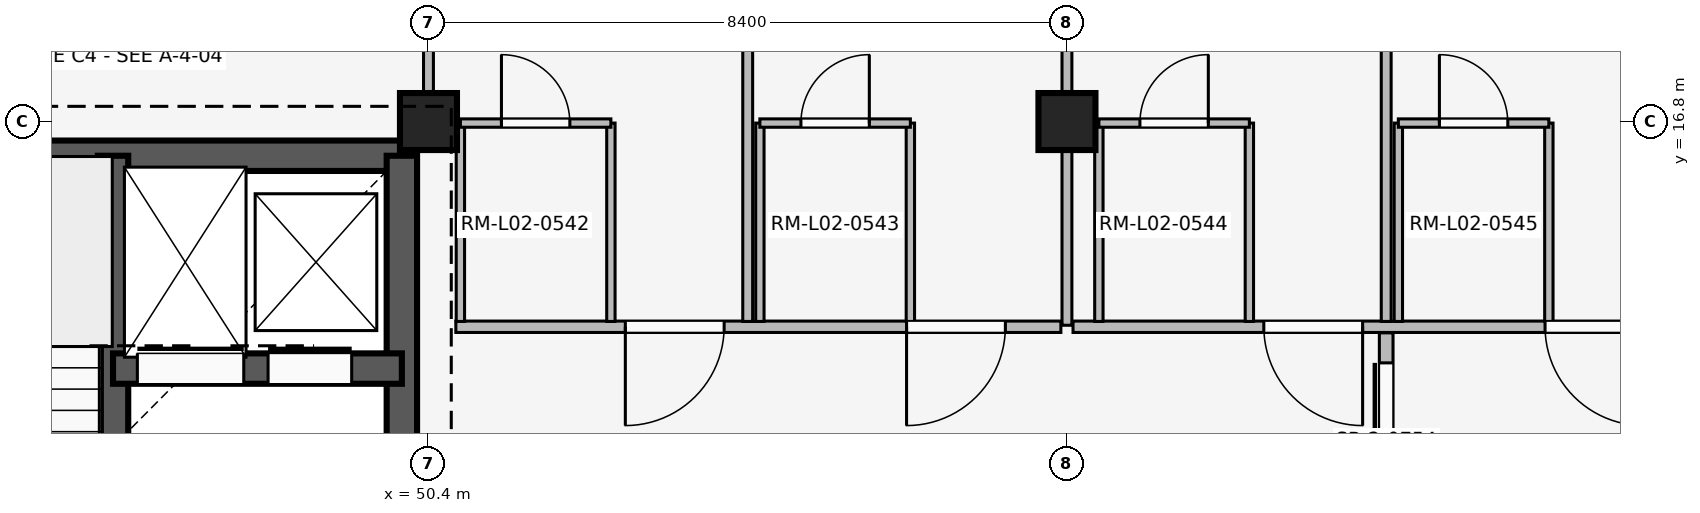
"""IFC4 building model, lengths in metres.
Left out: names, types, materials, properties, quantities, classifications, styles, units other than length and angle.
Written with IfcOpenShell. Run it as: python <this file> out.ifc"""

import sys

from ifc_helpers import new_model, si_unit, direction, frame, frame_2d, origin, origin_2d, place, context, subcontext, project, spatial, rectangle, extrude, element, fill, save


model = new_model("IFC4")
c1 = context("Model", 3, precision=1e-05, world=origin(), true_north=direction((0.0, 1.0)))
c2 = subcontext(c1, "Body", "Model", "MODEL_VIEW")
j1 = project(units=[si_unit("LENGTHUNIT", "METRE"), si_unit("PLANEANGLEUNIT", "RADIAN")], contexts=[c1])
p1 = place(None, origin())
s1 = spatial("IfcSite", under=j1, at=p1, CompositionType="ELEMENT")
p2 = place(p1, origin())
s2 = spatial("IfcBuilding", under=s1, at=p2, CompositionType="ELEMENT")
p3 = place(p2, frame((0.0, 0.0, 8.1)))
s3 = spatial("IfcBuildingStorey", under=s2, at=p3, CompositionType="ELEMENT", Elevation=8.1)
for number, where, z_axis, x_axis in (
    (1, (50.4, 16.8, 0.0), (0.0, 0.0, 1.0), (1.0, 0.0, 0.0)),
    (2, (58.8, 16.8, 0.0), (0.0, 0.0, 1.0), (1.0, 0.0, 0.0)),
):
    element("IfcColumn", number, at=place(p3, frame(where, z_axis=z_axis, x_axis=x_axis)), inside=s3, PredefinedType="COLUMN", context=c2, shape_type="SweptSolid", body=[
        extrude(rectangle(XDim=0.75, YDim=0.75, at=origin_2d()), origin(), (0.0, 0.0, 1.0), 4.8),
    ])
p4 = place(p3, frame((42.55, 16.35, 0.0), z_axis=(0.0, 0.0, 1.0), x_axis=(1.0, 0.0, 0.0)))
e3 = element("IfcWall", 3, at=p4, inside=s3, PredefinedType="SHEAR", context=c2, shape_type="SweptSolid", body=[
    extrude(rectangle(XDim=7.5, YDim=0.4, at=frame_2d((3.75, 0.0))), origin(), (0.0, 0.0, 1.0), 4.52),
])
p5 = place(p3, frame((50.05, 8.8, 0.0), z_axis=(0.0, 0.0, 1.0), x_axis=(0.0, 1.0, 0.0)))
e4 = element("IfcWall", 4, at=p5, inside=s3, PredefinedType="SHEAR", context=c2, shape_type="SweptSolid", body=[
    extrude(rectangle(XDim=7.55, YDim=0.4, at=frame_2d((3.775, 0.0))), origin(), (0.0, 0.0, 1.0), 4.52),
])
p6 = place(p5, frame((2.4, 0.0, 0.0)))
e5 = element("IfcOpeningElement", 5, at=p6, cuts=e4, PredefinedType="OPENING", context=c2, shape_type="SweptSolid", body=[
    extrude(rectangle(XDim=1.2, YDim=2.2, at=frame_2d((0.6, 1.1))), frame((0.0, 0.21, 0.0), z_axis=(0.0, -1.0, 0.0), x_axis=(1.0, 0.0, 0.0)), (0.0, 0.0, 1.0), 0.42),
])
p7 = place(p3, frame((46.25, 8.8, 0.0), z_axis=(0.0, 0.0, 1.0), x_axis=(0.0, 1.0, 0.0)))
e6 = element("IfcWall", 6, at=p7, inside=s3, PredefinedType="SHEAR", context=c2, shape_type="SweptSolid", body=[
    extrude(rectangle(XDim=7.55, YDim=0.4, at=frame_2d((3.775, 0.0))), origin(), (0.0, 0.0, 1.0), 4.52),
])
p8 = place(p7, frame((0.28, 0.0, 0.0)))
e7 = element("IfcOpeningElement", 7, at=p8, cuts=e6, PredefinedType="OPENING", context=c2, shape_type="SweptSolid", body=[
    extrude(rectangle(XDim=1.0, YDim=2.15, at=frame_2d((0.5, 1.075))), frame((0.0, 0.21, 0.0), z_axis=(0.0, -1.0, 0.0), x_axis=(1.0, 0.0, 0.0)), (0.0, 0.0, 1.0), 0.42),
])
p9 = place(p3, frame((46.25, 13.55, 0.0), z_axis=(0.0, 0.0, 1.0), x_axis=(1.0, 0.0, 0.0)))
e8 = element("IfcWall", 8, at=p9, inside=s3, PredefinedType="SHEAR", context=c2, shape_type="SweptSolid", body=[
    extrude(rectangle(XDim=3.8, YDim=0.4, at=frame_2d((1.9, 0.0))), origin(), (0.0, 0.0, 1.0), 4.52),
])
p10 = place(p9, frame((0.32, 0.0, 0.0)))
e9 = element("IfcOpeningElement", 9, at=p10, cuts=e8, PredefinedType="OPENING", context=c2, shape_type="SweptSolid", body=[
    extrude(rectangle(XDim=1.4, YDim=2.25, at=frame_2d((0.7, 1.125))), frame((0.0, 0.21, 0.0), z_axis=(0.0, -1.0, 0.0), x_axis=(1.0, 0.0, 0.0)), (0.0, 0.0, 1.0), 0.42),
])
p11 = place(p9, frame((2.04, 0.0, 0.0)))
e10 = element("IfcOpeningElement", 10, at=p11, cuts=e8, PredefinedType="OPENING", context=c2, shape_type="SweptSolid", body=[
    extrude(rectangle(XDim=1.1, YDim=2.15, at=frame_2d((0.55, 1.075))), frame((0.0, 0.21, 0.0), z_axis=(0.0, -1.0, 0.0), x_axis=(1.0, 0.0, 0.0)), (0.0, 0.0, 1.0), 0.42),
])
p12 = place(p3, frame((50.4, 17.15, 0.0), z_axis=(0.0, 0.0, 1.0), x_axis=(0.0, 1.0, 0.0)))
e11 = element("IfcWall", 11, at=p12, inside=s3, PredefinedType="PARTITIONING", context=c2, shape_type="SweptSolid", body=[
    extrude(rectangle(XDim=7.91, YDim=0.13, at=frame_2d((3.955, 0.0))), origin(), (0.0, 0.0, 1.0), 3.84),
])
p13 = place(p12, frame((3.4, 0.0, 0.0)))
e12 = element("IfcOpeningElement", 12, at=p13, cuts=e11, PredefinedType="OPENING", context=c2, shape_type="SweptSolid", body=[
    extrude(rectangle(XDim=1.05, YDim=2.2, at=frame_2d((0.525, 1.1))), frame((0.0, 0.075, 0.0), z_axis=(0.0, -1.0, 0.0), x_axis=(1.0, 0.0, 0.0)), (0.0, 0.0, 1.0), 0.15),
])
p14 = place(p3, frame((58.72, 14.1, 0.0), z_axis=(0.0, 0.0, 1.0), x_axis=(-1.0, 0.0, 0.0)))
e13 = element("IfcWall", 13, at=p14, inside=s3, PredefinedType="PARTITIONING", context=c2, shape_type="SweptSolid", body=[
    extrude(rectangle(XDim=7.96, YDim=0.15, at=frame_2d((3.98, 0.0))), origin(), (0.0, 0.0, 1.0), 3.84),
])
p15 = place(p14, frame((0.73, 0.0, 0.0)))
e14 = element("IfcOpeningElement", 14, at=p15, cuts=e13, PredefinedType="OPENING", context=c2, shape_type="SweptSolid", body=[
    extrude(rectangle(XDim=1.3, YDim=2.25, at=frame_2d((0.65, 1.125))), frame((0.0, 0.085, 0.0), z_axis=(0.0, -1.0, 0.0), x_axis=(1.0, 0.0, 0.0)), (0.0, 0.0, 1.0), 0.17),
])
p16 = place(p14, frame((4.43, 0.0, 0.0)))
e15 = element("IfcOpeningElement", 15, at=p16, cuts=e13, PredefinedType="OPENING", context=c2, shape_type="SweptSolid", body=[
    extrude(rectangle(XDim=1.3, YDim=2.25, at=frame_2d((0.65, 1.125))), frame((0.0, 0.085, 0.0), z_axis=(0.0, -1.0, 0.0), x_axis=(1.0, 0.0, 0.0)), (0.0, 0.0, 1.0), 0.17),
])
p17 = place(p3, frame((54.6, 14.17, 0.0), z_axis=(0.0, 0.0, 1.0), x_axis=(0.0, 1.0, 0.0)))
e16 = element("IfcWall", 16, at=p17, inside=s3, PredefinedType="PARTITIONING", context=c2, shape_type="SweptSolid", body=[
    extrude(rectangle(XDim=10.93, YDim=0.13, at=frame_2d((5.465, 0.0))), origin(), (0.0, 0.0, 1.0), 3.84),
])
for number, where, z_axis, x_axis in (
    (17, (50.82, 14.17, 0.0), (0.0, 0.0, 1.0), (0.0, 1.0, 0.0)),
    (18, (52.8, 14.17, 0.0), (0.0, 0.0, 1.0), (0.0, 1.0, 0.0)),
):
    element("IfcWall", number, at=place(p3, frame(where, z_axis=z_axis, x_axis=x_axis)), inside=s3, PredefinedType="PARTITIONING", context=c2, shape_type="SweptSolid", body=[
        extrude(rectangle(XDim=2.61, YDim=0.11, at=frame_2d((1.305, 0.0))), origin(), (0.0, 0.0, 1.0), 3.84),
    ])
p18 = place(p3, frame((50.82, 16.78, 0.0), z_axis=(0.0, 0.0, 1.0), x_axis=(1.0, 0.0, 0.0)))
e19 = element("IfcWall", 19, at=p18, inside=s3, PredefinedType="PARTITIONING", context=c2, shape_type="SweptSolid", body=[
    extrude(rectangle(XDim=1.98, YDim=0.11, at=frame_2d((0.99, 0.0))), origin(), (0.0, 0.0, 1.0), 3.84),
])
p19 = place(p18, frame((0.54, 0.0, 0.0)))
e20 = element("IfcOpeningElement", 20, at=p19, cuts=e19, PredefinedType="OPENING", context=c2, shape_type="SweptSolid", body=[
    extrude(rectangle(XDim=0.9, YDim=2.1, at=frame_2d((0.45, 1.05))), frame((0.0, 0.065, 0.0), z_axis=(0.0, -1.0, 0.0), x_axis=(1.0, 0.0, 0.0)), (0.0, 0.0, 1.0), 0.13),
])
for number, where, z_axis, x_axis in (
    (21, (54.76, 14.17, 0.0), (0.0, 0.0, 1.0), (0.0, 1.0, 0.0)),
    (22, (56.74, 14.17, 0.0), (0.0, 0.0, 1.0), (0.0, 1.0, 0.0)),
):
    element("IfcWall", number, at=place(p3, frame(where, z_axis=z_axis, x_axis=x_axis)), inside=s3, PredefinedType="PARTITIONING", context=c2, shape_type="SweptSolid", body=[
        extrude(rectangle(XDim=2.61, YDim=0.11, at=frame_2d((1.305, 0.0))), origin(), (0.0, 0.0, 1.0), 3.84),
    ])
p20 = place(p3, frame((54.76, 16.78, 0.0), z_axis=(0.0, 0.0, 1.0), x_axis=(1.0, 0.0, 0.0)))
e23 = element("IfcWall", 23, at=p20, inside=s3, PredefinedType="PARTITIONING", context=c2, shape_type="SweptSolid", body=[
    extrude(rectangle(XDim=1.98, YDim=0.11, at=frame_2d((0.99, 0.0))), origin(), (0.0, 0.0, 1.0), 3.84),
])
p21 = place(p20, frame((0.54, 0.0, 0.0)))
e24 = element("IfcOpeningElement", 24, at=p21, cuts=e23, PredefinedType="OPENING", context=c2, shape_type="SweptSolid", body=[
    extrude(rectangle(XDim=0.9, YDim=2.1, at=frame_2d((0.45, 1.05))), frame((0.0, 0.065, 0.0), z_axis=(0.0, -1.0, 0.0), x_axis=(1.0, 0.0, 0.0)), (0.0, 0.0, 1.0), 0.13),
])
p22 = place(p3, frame((58.8, 14.12, 0.0), z_axis=(0.0, 0.0, 1.0), x_axis=(0.0, 1.0, 0.0)))
e25 = element("IfcWall", 25, at=p22, inside=s3, PredefinedType="PARTITIONING", context=c2, shape_type="SweptSolid", body=[
    extrude(rectangle(XDim=10.94, YDim=0.13, at=frame_2d((5.47, 0.0))), origin(), (0.0, 0.0, 1.0), 3.84),
])
p23 = place(p3, frame((67.12, 14.1, 0.0), z_axis=(0.0, 0.0, 1.0), x_axis=(-1.0, 0.0, 0.0)))
e26 = element("IfcWall", 26, at=p23, inside=s3, PredefinedType="PARTITIONING", context=c2, shape_type="SweptSolid", body=[
    extrude(rectangle(XDim=8.24, YDim=0.15, at=frame_2d((4.12, 0.0))), origin(), (0.0, 0.0, 1.0), 3.84),
])
p24 = place(p23, frame((0.73, 0.0, 0.0)))
e27 = element("IfcOpeningElement", 27, at=p24, cuts=e26, PredefinedType="OPENING", context=c2, shape_type="SweptSolid", body=[
    extrude(rectangle(XDim=1.3, YDim=2.25, at=frame_2d((0.65, 1.125))), frame((0.0, 0.085, 0.0), z_axis=(0.0, -1.0, 0.0), x_axis=(1.0, 0.0, 0.0)), (0.0, 0.0, 1.0), 0.17),
])
p25 = place(p23, frame((4.43, 0.0, 0.0)))
e28 = element("IfcOpeningElement", 28, at=p25, cuts=e26, PredefinedType="OPENING", context=c2, shape_type="SweptSolid", body=[
    extrude(rectangle(XDim=1.3, YDim=2.25, at=frame_2d((0.65, 1.125))), frame((0.0, 0.085, 0.0), z_axis=(0.0, -1.0, 0.0), x_axis=(1.0, 0.0, 0.0)), (0.0, 0.0, 1.0), 0.17),
])
p26 = place(p3, frame((63.0, 14.17, 0.0), z_axis=(0.0, 0.0, 1.0), x_axis=(0.0, 1.0, 0.0)))
e29 = element("IfcWall", 29, at=p26, inside=s3, PredefinedType="PARTITIONING", context=c2, shape_type="SweptSolid", body=[
    extrude(rectangle(XDim=10.93, YDim=0.13, at=frame_2d((5.465, 0.0))), origin(), (0.0, 0.0, 1.0), 3.84),
])
for number, where, z_axis, x_axis in (
    (30, (59.22, 14.17, 0.0), (0.0, 0.0, 1.0), (0.0, 1.0, 0.0)),
    (31, (61.2, 14.17, 0.0), (0.0, 0.0, 1.0), (0.0, 1.0, 0.0)),
):
    element("IfcWall", number, at=place(p3, frame(where, z_axis=z_axis, x_axis=x_axis)), inside=s3, PredefinedType="PARTITIONING", context=c2, shape_type="SweptSolid", body=[
        extrude(rectangle(XDim=2.61, YDim=0.11, at=frame_2d((1.305, 0.0))), origin(), (0.0, 0.0, 1.0), 3.84),
    ])
p27 = place(p3, frame((59.22, 16.78, 0.0), z_axis=(0.0, 0.0, 1.0), x_axis=(1.0, 0.0, 0.0)))
e32 = element("IfcWall", 32, at=p27, inside=s3, PredefinedType="PARTITIONING", context=c2, shape_type="SweptSolid", body=[
    extrude(rectangle(XDim=1.98, YDim=0.11, at=frame_2d((0.99, 0.0))), origin(), (0.0, 0.0, 1.0), 3.84),
])
p28 = place(p27, frame((0.54, 0.0, 0.0)))
e33 = element("IfcOpeningElement", 33, at=p28, cuts=e32, PredefinedType="OPENING", context=c2, shape_type="SweptSolid", body=[
    extrude(rectangle(XDim=0.9, YDim=2.1, at=frame_2d((0.45, 1.05))), frame((0.0, 0.065, 0.0), z_axis=(0.0, -1.0, 0.0), x_axis=(1.0, 0.0, 0.0)), (0.0, 0.0, 1.0), 0.13),
])
for number, where, z_axis, x_axis in (
    (34, (63.16, 14.17, 0.0), (0.0, 0.0, 1.0), (0.0, 1.0, 0.0)),
    (35, (65.14, 14.17, 0.0), (0.0, 0.0, 1.0), (0.0, 1.0, 0.0)),
):
    element("IfcWall", number, at=place(p3, frame(where, z_axis=z_axis, x_axis=x_axis)), inside=s3, PredefinedType="PARTITIONING", context=c2, shape_type="SweptSolid", body=[
        extrude(rectangle(XDim=2.61, YDim=0.11, at=frame_2d((1.305, 0.0))), origin(), (0.0, 0.0, 1.0), 3.84),
    ])
p29 = place(p3, frame((63.16, 16.78, 0.0), z_axis=(0.0, 0.0, 1.0), x_axis=(1.0, 0.0, 0.0)))
e36 = element("IfcWall", 36, at=p29, inside=s3, PredefinedType="PARTITIONING", context=c2, shape_type="SweptSolid", body=[
    extrude(rectangle(XDim=1.98, YDim=0.11, at=frame_2d((0.99, 0.0))), origin(), (0.0, 0.0, 1.0), 3.84),
])
p30 = place(p29, frame((0.54, 0.0, 0.0)))
e37 = element("IfcOpeningElement", 37, at=p30, cuts=e36, PredefinedType="OPENING", context=c2, shape_type="SweptSolid", body=[
    extrude(rectangle(XDim=0.9, YDim=2.1, at=frame_2d((0.45, 1.05))), frame((0.0, 0.065, 0.0), z_axis=(0.0, -1.0, 0.0), x_axis=(1.0, 0.0, 0.0)), (0.0, 0.0, 1.0), 0.13),
])
p31 = place(p3, frame((63.0, 11.18, 0.0), z_axis=(0.0, 0.0, 1.0), x_axis=(0.0, 1.0, 0.0)))
e38 = element("IfcWall", 38, at=p31, inside=s3, PredefinedType="PARTITIONING", context=c2, shape_type="SweptSolid", body=[
    extrude(rectangle(XDim=2.84, YDim=0.18, at=frame_2d((1.42, 0.0))), origin(), (0.0, 0.0, 1.0), 3.84),
])
p32 = place(p31, frame((0.395, 0.0, 0.0)))
e39 = element("IfcOpeningElement", 39, at=p32, cuts=e38, PredefinedType="OPENING", context=c2, shape_type="SweptSolid", body=[
    extrude(rectangle(XDim=2.05, YDim=2.35, at=frame_2d((1.025, 1.175))), frame((0.0, 0.1, 0.0), z_axis=(0.0, -1.0, 0.0), x_axis=(1.0, 0.0, 0.0)), (0.0, 0.0, 1.0), 0.2),
])
p33 = place(p10, origin())
e40 = element("IfcDoor", 40, at=p33, inside=s3, OperationType="SLIDING_TO_LEFT", PredefinedType="DOOR", context=c2, shape_type="SweptSolid", body=[
    extrude(rectangle(XDim=1.4, YDim=2.25, at=frame_2d((0.7, 1.125))), frame((0.0, 0.025, 0.0), z_axis=(0.0, -1.0, 0.0), x_axis=(1.0, 0.0, 0.0)), (0.0, 0.0, 1.0), 0.05),
])
fill(e9, e40)
p34 = place(p11, origin())
e41 = element("IfcDoor", 41, at=p34, inside=s3, OperationType="SLIDING_TO_LEFT", PredefinedType="DOOR", context=c2, shape_type="SweptSolid", body=[
    extrude(rectangle(XDim=1.1, YDim=2.15, at=frame_2d((0.55, 1.075))), frame((0.0, 0.025, 0.0), z_axis=(0.0, -1.0, 0.0), x_axis=(1.0, 0.0, 0.0)), (0.0, 0.0, 1.0), 0.05),
])
fill(e10, e41)
p35 = place(p15, origin())
e42 = element("IfcDoor", 42, at=p35, inside=s3, OperationType="SINGLE_SWING_RIGHT", PredefinedType="DOOR", context=c2, shape_type="SweptSolid", body=[
    extrude(rectangle(XDim=1.3, YDim=2.25, at=frame_2d((0.65, 1.125))), frame((0.0, 0.025, 0.0), z_axis=(0.0, -1.0, 0.0), x_axis=(1.0, 0.0, 0.0)), (0.0, 0.0, 1.0), 0.05),
])
fill(e14, e42)
p36 = place(p16, origin())
e43 = element("IfcDoor", 43, at=p36, inside=s3, OperationType="SINGLE_SWING_RIGHT", PredefinedType="DOOR", context=c2, shape_type="SweptSolid", body=[
    extrude(rectangle(XDim=1.3, YDim=2.25, at=frame_2d((0.65, 1.125))), frame((0.0, 0.025, 0.0), z_axis=(0.0, -1.0, 0.0), x_axis=(1.0, 0.0, 0.0)), (0.0, 0.0, 1.0), 0.05),
])
fill(e15, e43)
p37 = place(p19, origin())
e44 = element("IfcDoor", 44, at=p37, inside=s3, OperationType="SINGLE_SWING_LEFT", PredefinedType="DOOR", context=c2, shape_type="SweptSolid", body=[
    extrude(rectangle(XDim=0.9, YDim=2.1, at=frame_2d((0.45, 1.05))), frame((0.0, 0.025, 0.0), z_axis=(0.0, -1.0, 0.0), x_axis=(1.0, 0.0, 0.0)), (0.0, 0.0, 1.0), 0.05),
])
fill(e20, e44)
p38 = place(p21, origin())
e45 = element("IfcDoor", 45, at=p38, inside=s3, OperationType="SINGLE_SWING_RIGHT", PredefinedType="DOOR", context=c2, shape_type="SweptSolid", body=[
    extrude(rectangle(XDim=0.9, YDim=2.1, at=frame_2d((0.45, 1.05))), frame((0.0, 0.025, 0.0), z_axis=(0.0, -1.0, 0.0), x_axis=(1.0, 0.0, 0.0)), (0.0, 0.0, 1.0), 0.05),
])
fill(e24, e45)
p39 = place(p24, origin())
e46 = element("IfcDoor", 46, at=p39, inside=s3, OperationType="SINGLE_SWING_LEFT", PredefinedType="DOOR", context=c2, shape_type="SweptSolid", body=[
    extrude(rectangle(XDim=1.3, YDim=2.25, at=frame_2d((0.65, 1.125))), frame((0.0, 0.025, 0.0), z_axis=(0.0, -1.0, 0.0), x_axis=(1.0, 0.0, 0.0)), (0.0, 0.0, 1.0), 0.05),
])
fill(e27, e46)
p40 = place(p25, origin())
e47 = element("IfcDoor", 47, at=p40, inside=s3, OperationType="SINGLE_SWING_LEFT", PredefinedType="DOOR", context=c2, shape_type="SweptSolid", body=[
    extrude(rectangle(XDim=1.3, YDim=2.25, at=frame_2d((0.65, 1.125))), frame((0.0, 0.025, 0.0), z_axis=(0.0, -1.0, 0.0), x_axis=(1.0, 0.0, 0.0)), (0.0, 0.0, 1.0), 0.05),
])
fill(e28, e47)
p41 = place(p28, origin())
e48 = element("IfcDoor", 48, at=p41, inside=s3, OperationType="SINGLE_SWING_RIGHT", PredefinedType="DOOR", context=c2, shape_type="SweptSolid", body=[
    extrude(rectangle(XDim=0.9, YDim=2.1, at=frame_2d((0.45, 1.05))), frame((0.0, 0.025, 0.0), z_axis=(0.0, -1.0, 0.0), x_axis=(1.0, 0.0, 0.0)), (0.0, 0.0, 1.0), 0.05),
])
fill(e33, e48)
p42 = place(p30, origin())
e49 = element("IfcDoor", 49, at=p42, inside=s3, OperationType="SINGLE_SWING_LEFT", PredefinedType="DOOR", context=c2, shape_type="SweptSolid", body=[
    extrude(rectangle(XDim=0.9, YDim=2.1, at=frame_2d((0.45, 1.05))), frame((0.0, 0.025, 0.0), z_axis=(0.0, -1.0, 0.0), x_axis=(1.0, 0.0, 0.0)), (0.0, 0.0, 1.0), 0.05),
])
fill(e37, e49)
p43 = place(p32, origin())
e50 = element("IfcDoor", 50, at=p43, inside=s3, OperationType="SLIDING_TO_LEFT", PredefinedType="DOOR", context=c2, shape_type="SweptSolid", body=[
    extrude(rectangle(XDim=2.05, YDim=2.35, at=frame_2d((1.025, 1.175))), frame((0.0, 0.025, 0.0), z_axis=(0.0, -1.0, 0.0), x_axis=(1.0, 0.0, 0.0)), (0.0, 0.0, 1.0), 0.05),
])
fill(e39, e50)
save(model, sys.argv[1])
